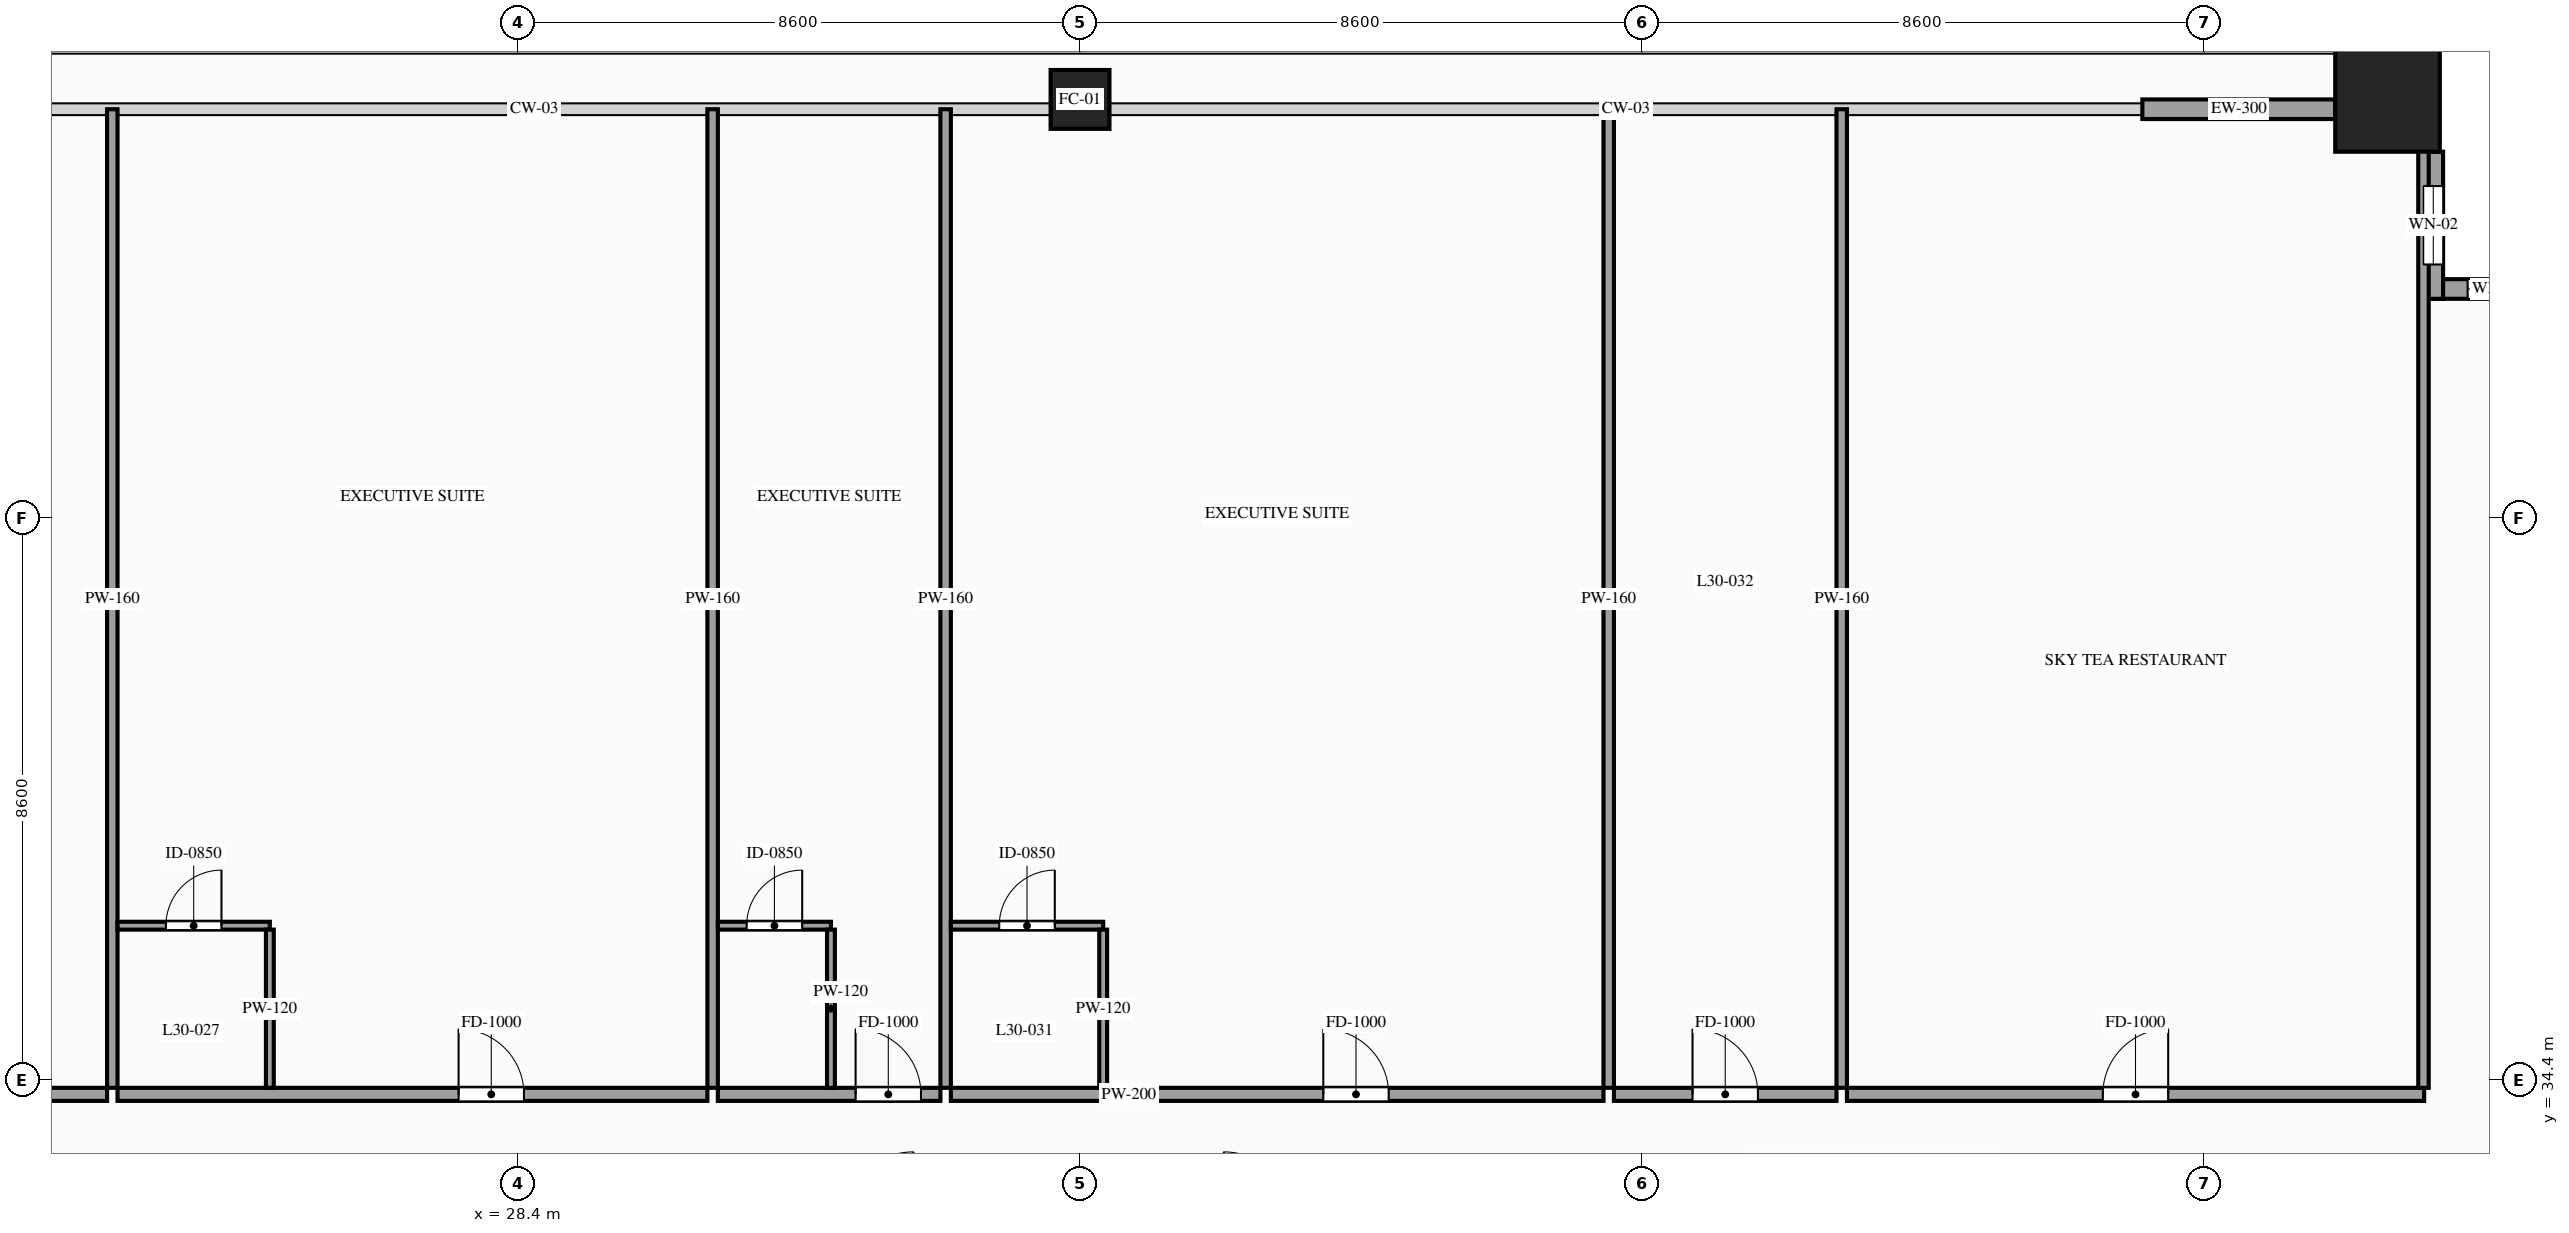
"""IFC4 building model, lengths in metres.
Left out: names, types, materials, properties, quantities, classifications, styles, units other than length and angle.
Written with IfcOpenShell. Run it as: python <this file> out.ifc"""

import sys

from ifc_helpers import new_model, si_unit, direction, frame, frame_2d, origin, origin_2d, place, context, subcontext, project, spatial, rectangle, hollow_rectangle, extrude, source, transform, mapped, element, fill, save


model = new_model("IFC4")
c1 = context("Model", 3, precision=1e-05, world=origin(), true_north=direction((0.0, 1.0)))
c2 = subcontext(c1, "Body", "Model", "MODEL_VIEW")
j1 = project(units=[si_unit("LENGTHUNIT", "METRE"), si_unit("PLANEANGLEUNIT", "RADIAN")], contexts=[c1])
p1 = place(None, origin())
s1 = spatial("IfcSite", under=j1, at=p1, CompositionType="ELEMENT")
p2 = place(p1, origin())
s2 = spatial("IfcBuilding", under=s1, at=p2, CompositionType="ELEMENT")
p3 = place(p2, frame((0.0, 0.0, 115.4)))
s3 = spatial("IfcBuildingStorey", under=s2, at=p3, CompositionType="ELEMENT", Elevation=115.4)
m1 = source(origin(), c2, "Body", "SweptSolid", [
    extrude(hollow_rectangle(XDim=0.9, YDim=0.9, WallThickness=0.042, at=origin_2d()), origin(), (0.0, 0.0, 1.0), 3.6),
])
p4 = place(p3, frame((37.0, 49.4, 0.0), z_axis=(0.0, 0.0, 1.0), x_axis=(1.0, 0.0, 0.0)))
e1 = element("IfcColumn", 1, at=p4, inside=s3, PredefinedType="COLUMN", context=c2, shape_type="MappedRepresentation", body=[
    mapped(m1, transform((0.0, 0.0, 0.0), scale=1.0)),
])
m2 = source(origin(), c2, "Body", "SweptSolid", [
    extrude(hollow_rectangle(XDim=1.6, YDim=1.6, WallThickness=0.07, at=origin_2d()), origin(), (0.0, 0.0, 1.0), 3.6),
])
p5 = place(p3, frame((57.0, 49.4, 0.0), z_axis=(0.0, 0.0, 1.0), x_axis=(1.0, 0.0, 0.0)))
e2 = element("IfcColumn", 2, at=p5, inside=s3, PredefinedType="COLUMN", context=c2, shape_type="MappedRepresentation", body=[
    mapped(m2, transform((0.0, 0.0, 0.0), scale=1.0)),
])
p6 = place(p3, frame((59.8, 46.5, 0.0), z_axis=(0.0, 0.0, 1.0), x_axis=(-1.0, 0.0, 0.0)))
e3 = element("IfcWall", 3, at=p6, inside=s3, PredefinedType="SOLIDWALL", context=c2, shape_type="SweptSolid", body=[
    extrude(rectangle(XDim=2.25, YDim=0.3, at=frame_2d((1.125, 0.0))), origin(), (0.0, 0.0, 1.0), 3.38),
])
p7 = place(p6, frame((0.675, 0.0, 0.85)))
e4 = element("IfcOpeningElement", 4, at=p7, cuts=e3, PredefinedType="OPENING", context=c2, shape_type="SweptSolid", body=[
    extrude(rectangle(XDim=0.9, YDim=1.5, at=frame_2d((0.45, 0.75))), frame((0.0, 0.165, 0.0), z_axis=(0.0, -1.0, 0.0), x_axis=(1.0, 0.0, 0.0)), (0.0, 0.0, 1.0), 0.33),
])
p8 = place(p3, frame((57.7, 46.35, 0.0), z_axis=(0.0, 0.0, 1.0), x_axis=(0.0, 1.0, 0.0)))
e5 = element("IfcWall", 5, at=p8, inside=s3, PredefinedType="SOLIDWALL", context=c2, shape_type="SweptSolid", body=[
    extrude(rectangle(XDim=2.25, YDim=0.3, at=frame_2d((1.125, 0.0))), origin(), (0.0, 0.0, 1.0), 3.38),
])
p9 = place(p8, frame((0.525, 0.0, 0.85)))
e6 = element("IfcOpeningElement", 6, at=p9, cuts=e5, PredefinedType="OPENING", context=c2, shape_type="SweptSolid", body=[
    extrude(rectangle(XDim=1.2, YDim=2.1, at=frame_2d((0.6, 1.05))), frame((0.0, 0.165, 0.0), z_axis=(0.0, -1.0, 0.0), x_axis=(1.0, 0.0, 0.0)), (0.0, 0.0, 1.0), 0.33),
])
m3 = source(origin(), c2, "Body", "SweptSolid", [
    extrude(rectangle(XDim=2.95, YDim=0.3, at=frame_2d((1.475, 0.0))), origin(), (0.0, 0.0, 1.0), 2.775),
])
p10 = place(p3, frame((53.25, 49.25, 0.0), z_axis=(0.0, 0.0, 1.0), x_axis=(1.0, 0.0, 0.0)))
e7 = element("IfcWall", 7, at=p10, inside=s3, PredefinedType="SOLIDWALL", context=c2, shape_type="MappedRepresentation", body=[
    mapped(m3, transform((0.0, 0.0, 0.0), scale=1.0)),
])
p11 = place(p3, frame((16.44, 34.18, 0.0), z_axis=(0.0, 0.0, 1.0), x_axis=(1.0, 0.0, 0.0)))
e8 = element("IfcWall", 8, at=p11, inside=s3, PredefinedType="PARTITIONING", context=c2, shape_type="SweptSolid", body=[
    extrude(rectangle(XDim=5.677, YDim=0.2, at=frame_2d((2.838, 0.0))), origin(), (0.0, 0.0, 1.0), 3.38),
])
p12 = place(p11, frame((3.543, 0.0, 0.0)))
e9 = element("IfcOpeningElement", 9, at=p12, cuts=e8, PredefinedType="OPENING", context=c2, shape_type="SweptSolid", body=[
    extrude(rectangle(XDim=1.0, YDim=2.2, at=frame_2d((0.5, 1.1))), frame((0.0, 0.115, 0.0), z_axis=(0.0, -1.0, 0.0), x_axis=(1.0, 0.0, 0.0)), (0.0, 0.0, 1.0), 0.23),
])
m4 = source(origin(), c2, "Body", "SweptSolid", [
    extrude(rectangle(XDim=14.97, YDim=0.16, at=frame_2d((7.485, 0.0))), origin(), (0.0, 0.0, 1.0), 3.38),
])
p13 = place(p3, frame((22.197, 34.28, 0.0), z_axis=(0.0, 0.0, 1.0), x_axis=(0.0, 1.0, 0.0)))
e10 = element("IfcWall", 10, at=p13, inside=s3, PredefinedType="PARTITIONING", context=c2, shape_type="MappedRepresentation", body=[
    mapped(m4, transform((0.0, 0.0, 0.0), scale=1.0)),
])
p14 = place(p3, frame((22.277, 34.18, 0.0), z_axis=(0.0, 0.0, 1.0), x_axis=(1.0, 0.0, 0.0)))
e11 = element("IfcWall", 11, at=p14, inside=s3, PredefinedType="PARTITIONING", context=c2, shape_type="SweptSolid", body=[
    extrude(rectangle(XDim=9.023, YDim=0.2, at=frame_2d((4.511, 0.0))), origin(), (0.0, 0.0, 1.0), 3.38),
])
p15 = place(p14, frame((5.217, 0.0, 0.0)))
e12 = element("IfcOpeningElement", 12, at=p15, cuts=e11, PredefinedType="OPENING", context=c2, shape_type="SweptSolid", body=[
    extrude(rectangle(XDim=1.0, YDim=2.2, at=frame_2d((0.5, 1.1))), frame((0.0, 0.115, 0.0), z_axis=(0.0, -1.0, 0.0), x_axis=(1.0, 0.0, 0.0)), (0.0, 0.0, 1.0), 0.23),
])
p16 = place(p3, frame((31.38, 34.28, 0.0), z_axis=(0.0, 0.0, 1.0), x_axis=(0.0, 1.0, 0.0)))
e13 = element("IfcWall", 13, at=p16, inside=s3, PredefinedType="PARTITIONING", context=c2, shape_type="MappedRepresentation", body=[
    mapped(m4, transform((0.0, 0.0, 0.0), scale=1.0)),
])
p17 = place(p3, frame((22.277, 36.76, 0.0), z_axis=(0.0, 0.0, 1.0), x_axis=(1.0, 0.0, 0.0)))
e14 = element("IfcWall", 14, at=p17, inside=s3, PredefinedType="PARTITIONING", context=c2, shape_type="SweptSolid", body=[
    extrude(rectangle(XDim=2.33, YDim=0.12, at=frame_2d((1.165, 0.0))), origin(), (0.0, 0.0, 1.0), 3.38),
])
p18 = place(p17, frame((0.74, 0.0, 0.0)))
e15 = element("IfcOpeningElement", 15, at=p18, cuts=e14, PredefinedType="OPENING", context=c2, shape_type="SweptSolid", body=[
    extrude(rectangle(XDim=0.85, YDim=2.1, at=frame_2d((0.425, 1.05))), frame((0.0, 0.075, 0.0), z_axis=(0.0, -1.0, 0.0), x_axis=(1.0, 0.0, 0.0)), (0.0, 0.0, 1.0), 0.15),
])
m5 = source(origin(), c2, "Body", "SweptSolid", [
    extrude(rectangle(XDim=2.42, YDim=0.12, at=frame_2d((1.21, 0.0))), origin(), (0.0, 0.0, 1.0), 3.38),
])
p19 = place(p3, frame((24.607, 34.28, 0.0), z_axis=(0.0, 0.0, 1.0), x_axis=(0.0, 1.0, 0.0)))
e16 = element("IfcWall", 16, at=p19, inside=s3, PredefinedType="PARTITIONING", context=c2, shape_type="MappedRepresentation", body=[
    mapped(m5, transform((0.0, 0.0, 0.0), scale=1.0)),
])
p20 = place(p3, frame((31.46, 34.18, 0.0), z_axis=(0.0, 0.0, 1.0), x_axis=(1.0, 0.0, 0.0)))
e17 = element("IfcWall", 17, at=p20, inside=s3, PredefinedType="PARTITIONING", context=c2, shape_type="SweptSolid", body=[
    extrude(rectangle(XDim=3.404, YDim=0.2, at=frame_2d((1.702, 0.0))), origin(), (0.0, 0.0, 1.0), 3.38),
])
p21 = place(p20, frame((2.107, 0.0, 0.0)))
e18 = element("IfcOpeningElement", 18, at=p21, cuts=e17, PredefinedType="OPENING", context=c2, shape_type="SweptSolid", body=[
    extrude(rectangle(XDim=1.0, YDim=2.2, at=frame_2d((0.5, 1.1))), frame((0.0, 0.115, 0.0), z_axis=(0.0, -1.0, 0.0), x_axis=(1.0, 0.0, 0.0)), (0.0, 0.0, 1.0), 0.23),
])
p22 = place(p3, frame((34.944, 34.28, 0.0), z_axis=(0.0, 0.0, 1.0), x_axis=(0.0, 1.0, 0.0)))
e19 = element("IfcWall", 19, at=p22, inside=s3, PredefinedType="PARTITIONING", context=c2, shape_type="MappedRepresentation", body=[
    mapped(m4, transform((0.0, 0.0, 0.0), scale=1.0)),
])
p23 = place(p3, frame((31.46, 36.76, 0.0), z_axis=(0.0, 0.0, 1.0), x_axis=(1.0, 0.0, 0.0)))
e20 = element("IfcWall", 20, at=p23, inside=s3, PredefinedType="PARTITIONING", context=c2, shape_type="SweptSolid", body=[
    extrude(rectangle(XDim=1.73, YDim=0.12, at=frame_2d((0.865, 0.0))), origin(), (0.0, 0.0, 1.0), 3.38),
])
p24 = place(p23, frame((0.44, 0.0, 0.0)))
e21 = element("IfcOpeningElement", 21, at=p24, cuts=e20, PredefinedType="OPENING", context=c2, shape_type="SweptSolid", body=[
    extrude(rectangle(XDim=0.85, YDim=2.1, at=frame_2d((0.425, 1.05))), frame((0.0, 0.075, 0.0), z_axis=(0.0, -1.0, 0.0), x_axis=(1.0, 0.0, 0.0)), (0.0, 0.0, 1.0), 0.15),
])
p25 = place(p3, frame((33.19, 34.28, 0.0), z_axis=(0.0, 0.0, 1.0), x_axis=(0.0, 1.0, 0.0)))
e22 = element("IfcWall", 22, at=p25, inside=s3, PredefinedType="PARTITIONING", context=c2, shape_type="MappedRepresentation", body=[
    mapped(m5, transform((0.0, 0.0, 0.0), scale=1.0)),
])
p26 = place(p3, frame((35.024, 34.18, 0.0), z_axis=(0.0, 0.0, 1.0), x_axis=(1.0, 0.0, 0.0)))
e23 = element("IfcWall", 23, at=p26, inside=s3, PredefinedType="PARTITIONING", context=c2, shape_type="SweptSolid", body=[
    extrude(rectangle(XDim=9.983, YDim=0.2, at=frame_2d((4.992, 0.0))), origin(), (0.0, 0.0, 1.0), 3.38),
])
p27 = place(p26, frame((5.697, 0.0, 0.0)))
e24 = element("IfcOpeningElement", 24, at=p27, cuts=e23, PredefinedType="OPENING", context=c2, shape_type="SweptSolid", body=[
    extrude(rectangle(XDim=1.0, YDim=2.2, at=frame_2d((0.5, 1.1))), frame((0.0, 0.115, 0.0), z_axis=(0.0, -1.0, 0.0), x_axis=(1.0, 0.0, 0.0)), (0.0, 0.0, 1.0), 0.23),
])
p28 = place(p3, frame((45.087, 34.28, 0.0), z_axis=(0.0, 0.0, 1.0), x_axis=(0.0, 1.0, 0.0)))
e25 = element("IfcWall", 25, at=p28, inside=s3, PredefinedType="PARTITIONING", context=c2, shape_type="MappedRepresentation", body=[
    mapped(m4, transform((0.0, 0.0, 0.0), scale=1.0)),
])
p29 = place(p3, frame((35.024, 36.76, 0.0), z_axis=(0.0, 0.0, 1.0), x_axis=(1.0, 0.0, 0.0)))
e26 = element("IfcWall", 26, at=p29, inside=s3, PredefinedType="PARTITIONING", context=c2, shape_type="SweptSolid", body=[
    extrude(rectangle(XDim=2.33, YDim=0.12, at=frame_2d((1.165, 0.0))), origin(), (0.0, 0.0, 1.0), 3.38),
])
p30 = place(p29, frame((0.74, 0.0, 0.0)))
e27 = element("IfcOpeningElement", 27, at=p30, cuts=e26, PredefinedType="OPENING", context=c2, shape_type="SweptSolid", body=[
    extrude(rectangle(XDim=0.85, YDim=2.1, at=frame_2d((0.425, 1.05))), frame((0.0, 0.075, 0.0), z_axis=(0.0, -1.0, 0.0), x_axis=(1.0, 0.0, 0.0)), (0.0, 0.0, 1.0), 0.15),
])
p31 = place(p3, frame((37.354, 34.28, 0.0), z_axis=(0.0, 0.0, 1.0), x_axis=(0.0, 1.0, 0.0)))
e28 = element("IfcWall", 28, at=p31, inside=s3, PredefinedType="PARTITIONING", context=c2, shape_type="MappedRepresentation", body=[
    mapped(m5, transform((0.0, 0.0, 0.0), scale=1.0)),
])
p32 = place(p3, frame((45.167, 34.18, 0.0), z_axis=(0.0, 0.0, 1.0), x_axis=(1.0, 0.0, 0.0)))
e29 = element("IfcWall", 29, at=p32, inside=s3, PredefinedType="PARTITIONING", context=c2, shape_type="SweptSolid", body=[
    extrude(rectangle(XDim=3.404, YDim=0.2, at=frame_2d((1.702, 0.0))), origin(), (0.0, 0.0, 1.0), 3.38),
])
p33 = place(p32, frame((1.202, 0.0, 0.0)))
e30 = element("IfcOpeningElement", 30, at=p33, cuts=e29, PredefinedType="OPENING", context=c2, shape_type="SweptSolid", body=[
    extrude(rectangle(XDim=1.0, YDim=2.2, at=frame_2d((0.5, 1.1))), frame((0.0, 0.115, 0.0), z_axis=(0.0, -1.0, 0.0), x_axis=(1.0, 0.0, 0.0)), (0.0, 0.0, 1.0), 0.23),
])
p34 = place(p3, frame((48.651, 34.28, 0.0), z_axis=(0.0, 0.0, 1.0), x_axis=(0.0, 1.0, 0.0)))
e31 = element("IfcWall", 31, at=p34, inside=s3, PredefinedType="PARTITIONING", context=c2, shape_type="MappedRepresentation", body=[
    mapped(m4, transform((0.0, 0.0, 0.0), scale=1.0)),
])
p35 = place(p3, frame((48.731, 34.18, 0.0), z_axis=(0.0, 0.0, 1.0), x_axis=(1.0, 0.0, 0.0)))
e32 = element("IfcWall", 32, at=p35, inside=s3, PredefinedType="PARTITIONING", context=c2, shape_type="SweptSolid", body=[
    extrude(rectangle(XDim=8.829, YDim=0.2, at=frame_2d((4.415, 0.0))), origin(), (0.0, 0.0, 1.0), 3.38),
])
p36 = place(p35, frame((3.914, 0.0, 0.0)))
e33 = element("IfcOpeningElement", 33, at=p36, cuts=e32, PredefinedType="OPENING", context=c2, shape_type="SweptSolid", body=[
    extrude(rectangle(XDim=1.0, YDim=2.2, at=frame_2d((0.5, 1.1))), frame((0.0, 0.115, 0.0), z_axis=(0.0, -1.0, 0.0), x_axis=(1.0, 0.0, 0.0)), (0.0, 0.0, 1.0), 0.23),
])
m6 = source(origin(), c2, "Body", "SweptSolid", [
    extrude(rectangle(XDim=14.82, YDim=0.16, at=frame_2d((7.41, 0.0))), origin(), (0.0, 0.0, 1.0), 3.38),
])
p37 = place(p3, frame((57.55, 34.28, 0.0), z_axis=(0.0, 0.0, 1.0), x_axis=(0.0, 1.0, 0.0)))
e34 = element("IfcWall", 34, at=p37, inside=s3, PredefinedType="PARTITIONING", context=c2, shape_type="MappedRepresentation", body=[
    mapped(m6, transform((0.0, 0.0, 0.0), scale=1.0)),
])
m7 = source(origin(), c2, "Body", "SweptSolid", [
    extrude(rectangle(XDim=0.9, YDim=1.5, at=frame_2d((0.45, 0.75))), frame((0.0, 0.03, 0.0), z_axis=(0.0, -1.0, 0.0), x_axis=(1.0, 0.0, 0.0)), (0.0, 0.0, 1.0), 0.06),
])
p38 = place(p7, origin())
e35 = element("IfcWindow", 35, at=p38, inside=s3, PartitioningType="SINGLE_PANEL", PredefinedType="WINDOW", context=c2, shape_type="MappedRepresentation", body=[
    mapped(m7, transform((0.0, 0.0, 0.0), scale=1.0)),
])
fill(e4, e35)
m8 = source(origin(), c2, "Body", "SweptSolid", [
    extrude(rectangle(XDim=1.2, YDim=2.1, at=frame_2d((0.6, 1.05))), frame((0.0, 0.03, 0.0), z_axis=(0.0, -1.0, 0.0), x_axis=(1.0, 0.0, 0.0)), (0.0, 0.0, 1.0), 0.06),
])
p39 = place(p9, origin())
e36 = element("IfcWindow", 36, at=p39, inside=s3, PartitioningType="SINGLE_PANEL", PredefinedType="WINDOW", context=c2, shape_type="MappedRepresentation", body=[
    mapped(m8, transform((0.0, 0.0, 0.0), scale=1.0)),
])
fill(e6, e36)
m9 = source(origin(), c2, "Body", "SweptSolid", [
    extrude(rectangle(XDim=1.0, YDim=2.2, at=frame_2d((0.5, 1.1))), frame((0.0, 0.025, 0.0), z_axis=(0.0, -1.0, 0.0), x_axis=(1.0, 0.0, 0.0)), (0.0, 0.0, 1.0), 0.05),
])
p40 = place(p15, origin())
e37 = element("IfcDoor", 37, at=p40, inside=s3, OperationType="SINGLE_SWING_LEFT", PredefinedType="DOOR", context=c2, shape_type="MappedRepresentation", body=[
    mapped(m9, transform((0.0, 0.0, 0.0), scale=1.0)),
])
fill(e12, e37)
m10 = source(origin(), c2, "Body", "SweptSolid", [
    extrude(rectangle(XDim=0.85, YDim=2.1, at=frame_2d((0.425, 1.05))), frame((0.0, 0.025, 0.0), z_axis=(0.0, -1.0, 0.0), x_axis=(1.0, 0.0, 0.0)), (0.0, 0.0, 1.0), 0.05),
])
p41 = place(p18, origin())
e38 = element("IfcDoor", 38, at=p41, inside=s3, OperationType="SINGLE_SWING_RIGHT", PredefinedType="DOOR", context=c2, shape_type="MappedRepresentation", body=[
    mapped(m10, transform((0.0, 0.0, 0.0), scale=1.0)),
])
fill(e15, e38)
p42 = place(p21, origin())
e39 = element("IfcDoor", 39, at=p42, inside=s3, OperationType="SINGLE_SWING_LEFT", PredefinedType="DOOR", context=c2, shape_type="MappedRepresentation", body=[
    mapped(m9, transform((0.0, 0.0, 0.0), scale=1.0)),
])
fill(e18, e39)
p43 = place(p24, origin())
e40 = element("IfcDoor", 40, at=p43, inside=s3, OperationType="SINGLE_SWING_RIGHT", PredefinedType="DOOR", context=c2, shape_type="MappedRepresentation", body=[
    mapped(m10, transform((0.0, 0.0, 0.0), scale=1.0)),
])
fill(e21, e40)
p44 = place(p27, origin())
e41 = element("IfcDoor", 41, at=p44, inside=s3, OperationType="SINGLE_SWING_LEFT", PredefinedType="DOOR", context=c2, shape_type="MappedRepresentation", body=[
    mapped(m9, transform((0.0, 0.0, 0.0), scale=1.0)),
])
fill(e24, e41)
p45 = place(p30, origin())
e42 = element("IfcDoor", 42, at=p45, inside=s3, OperationType="SINGLE_SWING_RIGHT", PredefinedType="DOOR", context=c2, shape_type="MappedRepresentation", body=[
    mapped(m10, transform((0.0, 0.0, 0.0), scale=1.0)),
])
fill(e27, e42)
p46 = place(p33, origin())
e43 = element("IfcDoor", 43, at=p46, inside=s3, OperationType="SINGLE_SWING_LEFT", PredefinedType="DOOR", context=c2, shape_type="MappedRepresentation", body=[
    mapped(m9, transform((0.0, 0.0, 0.0), scale=1.0)),
])
fill(e30, e43)
p47 = place(p36, origin())
e44 = element("IfcDoor", 44, at=p47, inside=s3, OperationType="SINGLE_SWING_RIGHT", PredefinedType="DOOR", context=c2, shape_type="MappedRepresentation", body=[
    mapped(m9, transform((0.0, 0.0, 0.0), scale=1.0)),
])
fill(e33, e44)
save(model, sys.argv[1])
